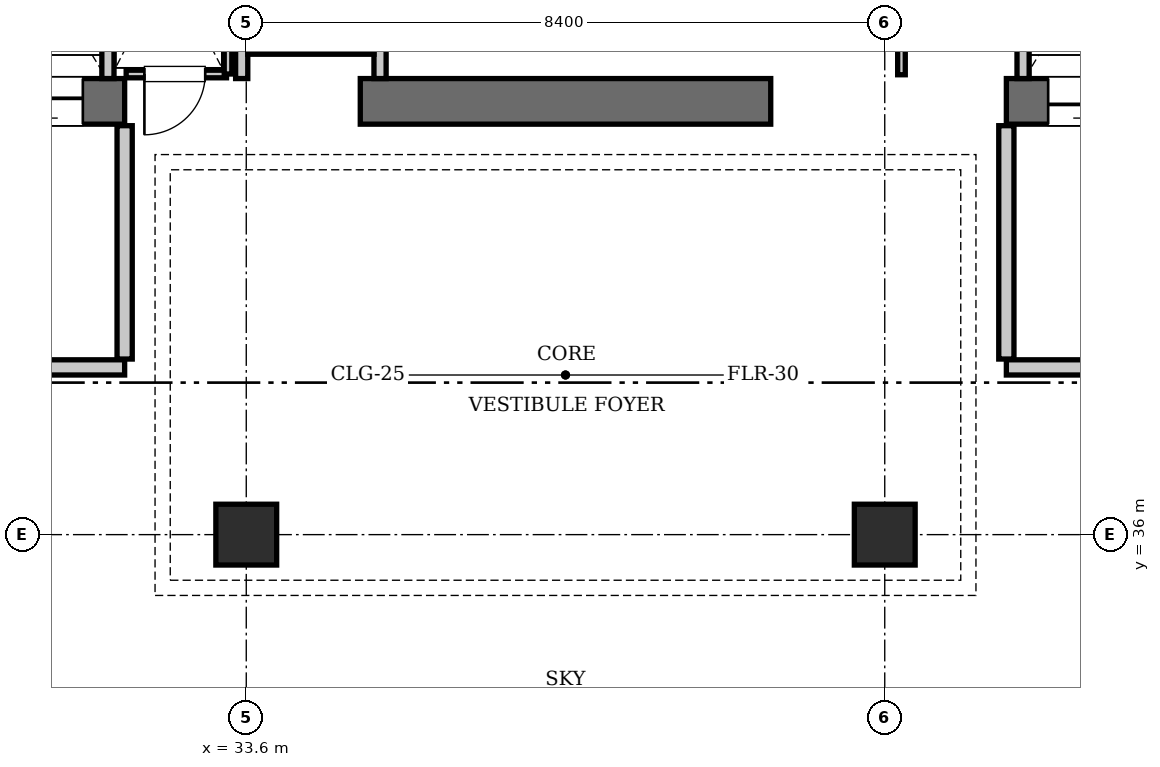
"""IFC4 building model, lengths in metres.
Left out: names, types, materials, properties, quantities, classifications, styles, units other than length and angle.
Written with IfcOpenShell. Run it as: python <this file> out.ifc"""

import sys

from ifc_helpers import new_model, si_unit, direction, frame, frame_2d, origin, origin_2d, place, context, subcontext, project, spatial, rectangle, extrude, element, fill, save


model = new_model("IFC4")
c1 = context("Model", 3, precision=1e-05, world=origin(), true_north=direction((0.0, 1.0)))
c2 = subcontext(c1, "Body", "Model", "MODEL_VIEW")
j1 = project(units=[si_unit("LENGTHUNIT", "METRE"), si_unit("PLANEANGLEUNIT", "RADIAN")], contexts=[c1])
p1 = place(None, origin())
s1 = spatial("IfcSite", under=j1, at=p1, CompositionType="ELEMENT")
p2 = place(p1, origin())
s2 = spatial("IfcBuilding", under=s1, at=p2, CompositionType="ELEMENT")
p3 = place(p2, frame((0.0, 0.0, 349.65)))
s3 = spatial("IfcBuildingStorey", under=s2, at=p3, CompositionType="ELEMENT", Elevation=349.65)
p4 = place(p3, frame((25.2, 41.7, 0.0), z_axis=(0.0, 0.0, 1.0), x_axis=(1.0, 0.0, 0.0)))
e1 = element("IfcWall", 1, at=p4, inside=s3, PredefinedType="SHEAR", context=c2, shape_type="SweptSolid", body=[
    extrude(rectangle(XDim=6.8, YDim=0.6, at=frame_2d((3.4, 0.0))), origin(), (0.0, 0.0, 1.0), 4.55),
])
p5 = place(p4, frame((1.65, 0.0, 0.0)))
e2 = element("IfcOpeningElement", 2, at=p5, cuts=e1, PredefinedType="OPENING", context=c2, shape_type="SweptSolid", body=[
    extrude(rectangle(XDim=1.15, YDim=2.15, at=frame_2d((0.575, 1.075))), frame((0.0, 0.31, 0.0), z_axis=(0.0, -1.0, 0.0), x_axis=(1.0, 0.0, 0.0)), (0.0, 0.0, 1.0), 0.62),
])
p6 = place(p4, frame((5.15, 0.0, 0.0)))
e3 = element("IfcOpeningElement", 3, at=p6, cuts=e1, PredefinedType="OPENING", context=c2, shape_type="SweptSolid", body=[
    extrude(rectangle(XDim=1.1, YDim=2.2, at=frame_2d((0.55, 1.1))), frame((0.0, 0.31, 0.0), z_axis=(0.0, -1.0, 0.0), x_axis=(1.0, 0.0, 0.0)), (0.0, 0.0, 1.0), 0.62),
])
p7 = place(p3, frame((35.1, 41.7, 0.0), z_axis=(0.0, 0.0, 1.0), x_axis=(1.0, 0.0, 0.0)))
e4 = element("IfcWall", 4, at=p7, inside=s3, PredefinedType="SHEAR", context=c2, shape_type="SweptSolid", body=[
    extrude(rectangle(XDim=5.4, YDim=0.6, at=frame_2d((2.7, 0.0))), origin(), (0.0, 0.0, 1.0), 4.55),
])
p8 = place(p3, frame((43.6, 41.7, 0.0), z_axis=(0.0, 0.0, 1.0), x_axis=(1.0, 0.0, 0.0)))
e5 = element("IfcWall", 5, at=p8, inside=s3, PredefinedType="SHEAR", context=c2, shape_type="SweptSolid", body=[
    extrude(rectangle(XDim=6.8, YDim=0.6, at=frame_2d((3.4, 0.0))), origin(), (0.0, 0.0, 1.0), 4.55),
])
p9 = place(p8, frame((3.9, 0.0, 0.0)))
e6 = element("IfcOpeningElement", 6, at=p9, cuts=e5, PredefinedType="OPENING", context=c2, shape_type="SweptSolid", body=[
    extrude(rectangle(XDim=1.15, YDim=2.15, at=frame_2d((0.575, 1.075))), frame((0.0, 0.31, 0.0), z_axis=(0.0, -1.0, 0.0), x_axis=(1.0, 0.0, 0.0)), (0.0, 0.0, 1.0), 0.62),
])
p10 = place(p8, frame((0.55, 0.0, 0.0)))
e7 = element("IfcOpeningElement", 7, at=p10, cuts=e5, PredefinedType="OPENING", context=c2, shape_type="SweptSolid", body=[
    extrude(rectangle(XDim=1.1, YDim=2.2, at=frame_2d((0.55, 1.1))), frame((0.0, 0.31, 0.0), z_axis=(0.0, -1.0, 0.0), x_axis=(1.0, 0.0, 0.0)), (0.0, 0.0, 1.0), 0.62),
])
for number, where, z_axis, x_axis in (
    (8, (33.6, 36.0, 0.0), (0.0, 0.0, 1.0), (1.0, 0.0, 0.0)),
    (9, (42.0, 36.0, 0.0), (0.0, 0.0, 1.0), (1.0, 0.0, 0.0)),
):
    element("IfcColumn", number, at=place(p3, frame(where, z_axis=z_axis, x_axis=x_axis)), inside=s3, PredefinedType="COLUMN", context=c2, shape_type="SweptSolid", body=[
        extrude(rectangle(XDim=0.8, YDim=0.8, at=origin_2d()), origin(), (0.0, 0.0, 1.0), 4.55),
    ])
for number, where, z_axis, x_axis in (
    (10, (31.78, 42.0, 0.0), (0.0, 0.0, 1.0), (0.0, 1.0, 0.0)),
    (11, (43.82, 42.0, 0.0), (0.0, 0.0, 1.0), (0.0, 1.0, 0.0)),
):
    element("IfcWall", number, at=place(p3, frame(where, z_axis=z_axis, x_axis=x_axis)), inside=s3, PredefinedType="SOLIDWALL", context=c2, shape_type="SweptSolid", body=[
        extrude(rectangle(XDim=2.74, YDim=0.16, at=frame_2d((1.37, 0.0))), origin(), (0.0, 0.0, 1.0), 4.29),
    ])
for number, where, z_axis, x_axis in (
    (12, (33.54, 42.0, 0.0), (0.0, 0.0, 1.0), (0.0, 1.0, 0.0)),
    (13, (35.36, 42.0, 0.0), (0.0, 0.0, 1.0), (0.0, 1.0, 0.0)),
):
    element("IfcWall", number, at=place(p3, frame(where, z_axis=z_axis, x_axis=x_axis)), inside=s3, PredefinedType="SOLIDWALL", context=c2, shape_type="SweptSolid", body=[
        extrude(rectangle(XDim=2.4, YDim=0.16, at=frame_2d((1.2, 0.0))), origin(), (0.0, 0.0, 1.0), 4.29),
    ])
p11 = place(p3, frame((33.62, 42.4, 0.0), z_axis=(0.0, 0.0, 1.0), x_axis=(1.0, 0.0, 0.0)))
e14 = element("IfcWall", 14, at=p11, inside=s3, PredefinedType="SOLIDWALL", context=c2, shape_type="SweptSolid", body=[
    extrude(rectangle(XDim=1.66, YDim=0.16, at=frame_2d((0.83, 0.0))), origin(), (0.0, 0.0, 1.0), 4.29),
])
p12 = place(p3, frame((26.2, 38.2, 0.0), z_axis=(0.0, 0.0, 1.0), x_axis=(1.0, 0.0, 0.0)))
e15 = element("IfcWall", 15, at=p12, inside=s3, PredefinedType="PARTITIONING", context=c2, shape_type="SweptSolid", body=[
    extrude(rectangle(XDim=5.8, YDim=0.2, at=frame_2d((2.9, 0.0))), origin(), (0.0, 0.0, 1.0), 4.29),
])
p13 = place(p12, frame((2.3, 0.0, 0.0)))
e16 = element("IfcOpeningElement", 16, at=p13, cuts=e15, PredefinedType="OPENING", context=c2, shape_type="SweptSolid", body=[
    extrude(rectangle(XDim=1.15, YDim=2.15, at=frame_2d((0.575, 1.075))), frame((0.0, 0.11, 0.0), z_axis=(0.0, -1.0, 0.0), x_axis=(1.0, 0.0, 0.0)), (0.0, 0.0, 1.0), 0.22),
])
p14 = place(p3, frame((32.0, 38.31, 0.0), z_axis=(0.0, 0.0, 1.0), x_axis=(0.0, 1.0, 0.0)))
e17 = element("IfcWall", 17, at=p14, inside=s3, PredefinedType="PARTITIONING", context=c2, shape_type="SweptSolid", body=[
    extrude(rectangle(XDim=3.07, YDim=0.2, at=frame_2d((1.535, 0.0))), origin(), (0.0, 0.0, 1.0), 4.29),
])
p15 = place(p3, frame((43.6, 38.2, 0.0), z_axis=(0.0, 0.0, 1.0), x_axis=(1.0, 0.0, 0.0)))
e18 = element("IfcWall", 18, at=p15, inside=s3, PredefinedType="PARTITIONING", context=c2, shape_type="SweptSolid", body=[
    extrude(rectangle(XDim=5.8, YDim=0.2, at=frame_2d((2.9, 0.0))), origin(), (0.0, 0.0, 1.0), 4.29),
])
p16 = place(p15, frame((2.3, 0.0, 0.0)))
e19 = element("IfcOpeningElement", 19, at=p16, cuts=e18, PredefinedType="OPENING", context=c2, shape_type="SweptSolid", body=[
    extrude(rectangle(XDim=1.15, YDim=2.15, at=frame_2d((0.575, 1.075))), frame((0.0, 0.11, 0.0), z_axis=(0.0, -1.0, 0.0), x_axis=(1.0, 0.0, 0.0)), (0.0, 0.0, 1.0), 0.22),
])
p17 = place(p3, frame((43.6, 38.31, 0.0), z_axis=(0.0, 0.0, 1.0), x_axis=(0.0, 1.0, 0.0)))
e20 = element("IfcWall", 20, at=p17, inside=s3, PredefinedType="PARTITIONING", context=c2, shape_type="SweptSolid", body=[
    extrude(rectangle(XDim=3.07, YDim=0.2, at=frame_2d((1.535, 0.0))), origin(), (0.0, 0.0, 1.0), 4.29),
])
p18 = place(p3, frame((32.02, 42.06, 0.0), z_axis=(0.0, 0.0, 1.0), x_axis=(1.0, 0.0, 0.0)))
e21 = element("IfcWall", 21, at=p18, inside=s3, PredefinedType="PARTITIONING", context=c2, shape_type="SweptSolid", body=[
    extrude(rectangle(XDim=1.32, YDim=0.1, at=frame_2d((0.66, 0.0))), origin(), (0.0, 0.0, 1.0), 4.29),
])
p19 = place(p18, frame((0.24, 0.0, 0.0)))
e22 = element("IfcOpeningElement", 22, at=p19, cuts=e21, PredefinedType="OPENING", context=c2, shape_type="SweptSolid", body=[
    extrude(rectangle(XDim=0.8, YDim=2.05, at=frame_2d((0.4, 1.025))), frame((0.0, 0.06, 0.0), z_axis=(0.0, -1.0, 0.0), x_axis=(1.0, 0.0, 0.0)), (0.0, 0.0, 1.0), 0.12),
])
p20 = place(p3, frame((33.36, 42.06, 0.0), z_axis=(0.0, 0.0, 1.0), x_axis=(0.0, 1.0, 0.0)))
e23 = element("IfcWall", 23, at=p20, inside=s3, PredefinedType="PARTITIONING", context=c2, shape_type="SweptSolid", body=[
    extrude(rectangle(XDim=2.88, YDim=0.1, at=frame_2d((1.44, 0.0))), origin(), (0.0, 0.0, 1.0), 4.29),
])
p21 = place(p3, frame((42.22, 42.05, 0.0), z_axis=(0.0, 0.0, 1.0), x_axis=(0.0, 1.0, 0.0)))
e24 = element("IfcWall", 24, at=p21, inside=s3, PredefinedType="PARTITIONING", context=c2, shape_type="SweptSolid", body=[
    extrude(rectangle(XDim=2.91, YDim=0.1, at=frame_2d((1.455, 0.0))), origin(), (0.0, 0.0, 1.0), 4.29),
])
p22 = place(p21, frame((0.65, 0.0, 0.0)))
e25 = element("IfcOpeningElement", 25, at=p22, cuts=e24, PredefinedType="OPENING", context=c2, shape_type="SweptSolid", body=[
    extrude(rectangle(XDim=0.8, YDim=2.05, at=frame_2d((0.4, 1.025))), frame((0.0, 0.06, 0.0), z_axis=(0.0, -1.0, 0.0), x_axis=(1.0, 0.0, 0.0)), (0.0, 0.0, 1.0), 0.12),
])
p23 = place(p6, frame((1.1, 0.0, 0.0), z_axis=(0.0, 0.0, 1.0), x_axis=(-1.0, 0.0, 0.0)))
e26 = element("IfcDoor", 26, at=p23, inside=s3, OperationType="SLIDING_TO_LEFT", PredefinedType="DOOR", context=c2, shape_type="SweptSolid", body=[
    extrude(rectangle(XDim=1.1, YDim=2.2, at=frame_2d((0.55, 1.1))), frame((0.0, 0.025, 0.0), z_axis=(0.0, -1.0, 0.0), x_axis=(1.0, 0.0, 0.0)), (0.0, 0.0, 1.0), 0.05),
])
fill(e3, e26)
p24 = place(p10, frame((1.1, 0.0, 0.0), z_axis=(0.0, 0.0, 1.0), x_axis=(-1.0, 0.0, 0.0)))
e27 = element("IfcDoor", 27, at=p24, inside=s3, OperationType="SLIDING_TO_LEFT", PredefinedType="DOOR", context=c2, shape_type="SweptSolid", body=[
    extrude(rectangle(XDim=1.1, YDim=2.2, at=frame_2d((0.55, 1.1))), frame((0.0, 0.025, 0.0), z_axis=(0.0, -1.0, 0.0), x_axis=(1.0, 0.0, 0.0)), (0.0, 0.0, 1.0), 0.05),
])
fill(e7, e27)
p25 = place(p19, frame((0.8, 0.0, 0.0), z_axis=(0.0, 0.0, 1.0), x_axis=(-1.0, 0.0, 0.0)))
e28 = element("IfcDoor", 28, at=p25, inside=s3, OperationType="SINGLE_SWING_RIGHT", PredefinedType="DOOR", context=c2, shape_type="SweptSolid", body=[
    extrude(rectangle(XDim=0.8, YDim=2.05, at=frame_2d((0.4, 1.025))), frame((0.0, 0.025, 0.0), z_axis=(0.0, -1.0, 0.0), x_axis=(1.0, 0.0, 0.0)), (0.0, 0.0, 1.0), 0.05),
])
fill(e22, e28)
save(model, sys.argv[1])
